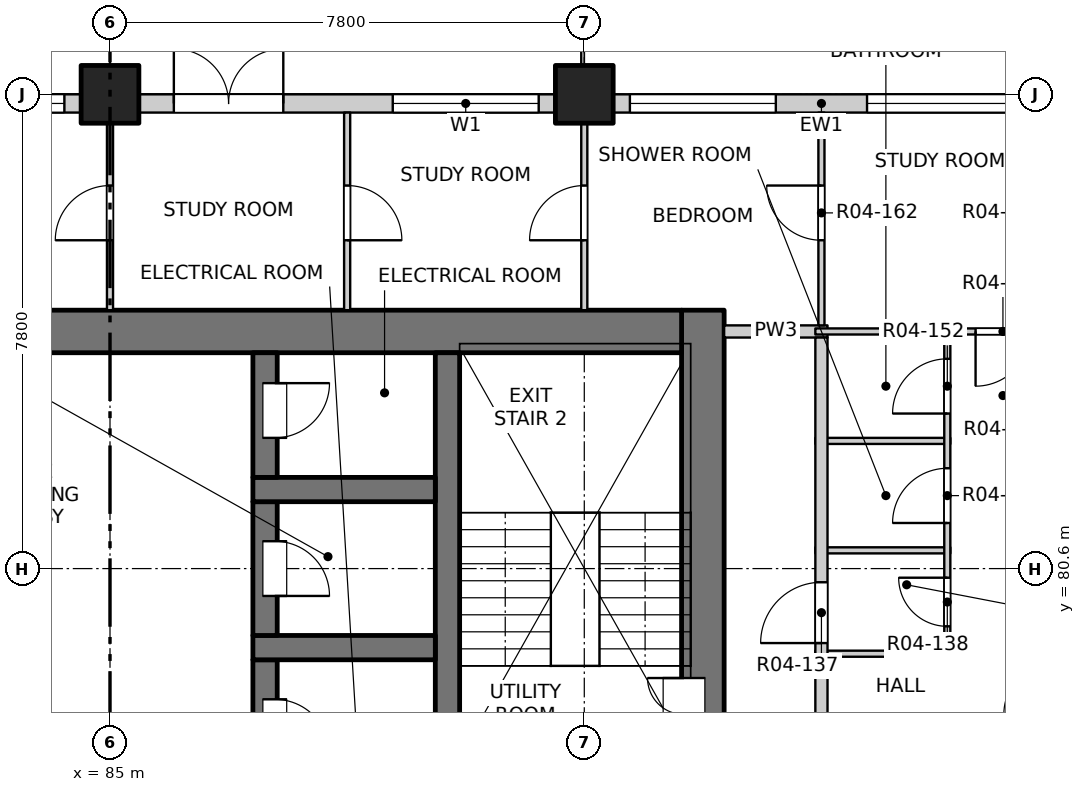
"""IFC4 building model, lengths in metres.
Left out: names, types, materials, properties, quantities, classifications, styles, units other than length and angle.
Written with IfcOpenShell. Run it as: python <this file> out.ifc"""

import sys

from ifc_helpers import new_model, si_unit, direction, frame, frame_2d, origin, origin_2d, place, context, subcontext, project, spatial, rectangle, extrude, element, fill, save


model = new_model("IFC4")
c1 = context("Model", 3, precision=1e-05, world=origin(), true_north=direction((0.0, 1.0)))
c2 = subcontext(c1, "Body", "Model", "MODEL_VIEW")
j1 = project(units=[si_unit("LENGTHUNIT", "METRE"), si_unit("PLANEANGLEUNIT", "RADIAN")], contexts=[c1])
p1 = place(None, origin())
s1 = spatial("IfcSite", under=j1, at=p1, CompositionType="ELEMENT")
p2 = place(p1, origin())
s2 = spatial("IfcBuilding", under=s1, at=p2, CompositionType="ELEMENT")
p3 = place(p2, frame((0.0, 0.0, 58.0)))
s3 = spatial("IfcBuildingStorey", under=s2, at=p3, CompositionType="ELEMENT", Elevation=58.0)
for number, where, z_axis, x_axis in (
    (1, (85.0, 88.4, -0.25), (0.0, 0.0, 1.0), (1.0, 0.0, 0.0)),
    (2, (92.8, 88.4, -0.25), (0.0, 0.0, 1.0), (1.0, 0.0, 0.0)),
):
    element("IfcColumn", number, at=place(p3, frame(where, z_axis=z_axis, x_axis=x_axis)), inside=s3, PredefinedType="COLUMN", context=c2, shape_type="SweptSolid", body=[
        extrude(rectangle(XDim=0.95, YDim=0.95, at=origin_2d()), origin(), (0.0, 0.0, 1.0), 3.4),
    ])
p4 = place(p3, frame((94.75, 77.3, -0.25), z_axis=(0.0, 0.0, 1.0), x_axis=(0.0, 1.0, 0.0)))
e3 = element("IfcWall", 3, at=p4, inside=s3, PredefinedType="SOLIDWALL", context=c2, shape_type="SweptSolid", body=[
    extrude(rectangle(XDim=7.55, YDim=0.7, at=frame_2d((3.775, 0.0))), origin(), (0.0, 0.0, 1.0), 3.4),
])
p5 = place(p4, frame((0.3, 0.0, 0.25)))
e4 = element("IfcOpeningElement", 4, at=p5, cuts=e3, PredefinedType="OPENING", context=c2, shape_type="SweptSolid", body=[
    extrude(rectangle(XDim=1.2, YDim=2.1, at=frame_2d((0.6, 1.05))), frame((0.0, 0.36, 0.0), z_axis=(0.0, -1.0, 0.0), x_axis=(1.0, 0.0, 0.0)), (0.0, 0.0, 1.0), 0.72),
])
p6 = place(p3, frame((75.6, 84.5, -0.25), z_axis=(0.0, 0.0, 1.0), x_axis=(1.0, 0.0, 0.0)))
e5 = element("IfcWall", 5, at=p6, inside=s3, PredefinedType="SOLIDWALL", context=c2, shape_type="SweptSolid", body=[
    extrude(rectangle(XDim=18.8, YDim=0.7, at=frame_2d((9.4, 0.0))), origin(), (0.0, 0.0, 1.0), 3.4),
])
p7 = place(p3, frame((90.55, 77.3, -0.25), z_axis=(0.0, 0.0, 1.0), x_axis=(0.0, 1.0, 0.0)))
e6 = element("IfcWall", 6, at=p7, inside=s3, PredefinedType="SOLIDWALL", context=c2, shape_type="SweptSolid", body=[
    extrude(rectangle(XDim=6.85, YDim=0.4, at=frame_2d((3.425, 0.0))), origin(), (0.0, 0.0, 1.0), 3.4),
])
p8 = place(p3, frame((87.55, 76.9, -0.25), z_axis=(0.0, 0.0, 1.0), x_axis=(0.0, 1.0, 0.0)))
e7 = element("IfcWall", 7, at=p8, inside=s3, PredefinedType="SOLIDWALL", context=c2, shape_type="SweptSolid", body=[
    extrude(rectangle(XDim=2.2, YDim=0.4, at=frame_2d((1.1, 0.0))), origin(), (0.0, 0.0, 1.0), 3.4),
])
p9 = place(p8, frame((0.65, 0.0, 0.25)))
e8 = element("IfcOpeningElement", 8, at=p9, cuts=e7, PredefinedType="OPENING", context=c2, shape_type="SweptSolid", body=[
    extrude(rectangle(XDim=0.9, YDim=2.1, at=frame_2d((0.45, 1.05))), frame((0.0, 0.21, 0.0), z_axis=(0.0, -1.0, 0.0), x_axis=(1.0, 0.0, 0.0)), (0.0, 0.0, 1.0), 0.42),
])
p10 = place(p3, frame((87.35, 79.3, -0.25), z_axis=(0.0, 0.0, 1.0), x_axis=(1.0, 0.0, 0.0)))
e9 = element("IfcWall", 9, at=p10, inside=s3, PredefinedType="SOLIDWALL", context=c2, shape_type="SweptSolid", body=[
    extrude(rectangle(XDim=3.0, YDim=0.4, at=frame_2d((1.5, 0.0))), origin(), (0.0, 0.0, 1.0), 3.4),
])
p11 = place(p3, frame((87.55, 79.5, -0.25), z_axis=(0.0, 0.0, 1.0), x_axis=(0.0, 1.0, 0.0)))
e10 = element("IfcWall", 10, at=p11, inside=s3, PredefinedType="SOLIDWALL", context=c2, shape_type="SweptSolid", body=[
    extrude(rectangle(XDim=2.2, YDim=0.4, at=frame_2d((1.1, 0.0))), origin(), (0.0, 0.0, 1.0), 3.4),
])
p12 = place(p11, frame((0.65, 0.0, 0.25)))
e11 = element("IfcOpeningElement", 11, at=p12, cuts=e10, PredefinedType="OPENING", context=c2, shape_type="SweptSolid", body=[
    extrude(rectangle(XDim=0.9, YDim=2.1, at=frame_2d((0.45, 1.05))), frame((0.0, 0.21, 0.0), z_axis=(0.0, -1.0, 0.0), x_axis=(1.0, 0.0, 0.0)), (0.0, 0.0, 1.0), 0.42),
])
p13 = place(p3, frame((87.35, 81.9, -0.25), z_axis=(0.0, 0.0, 1.0), x_axis=(1.0, 0.0, 0.0)))
e12 = element("IfcWall", 12, at=p13, inside=s3, PredefinedType="SOLIDWALL", context=c2, shape_type="SweptSolid", body=[
    extrude(rectangle(XDim=3.0, YDim=0.4, at=frame_2d((1.5, 0.0))), origin(), (0.0, 0.0, 1.0), 3.4),
])
p14 = place(p3, frame((87.55, 82.1, -0.25), z_axis=(0.0, 0.0, 1.0), x_axis=(0.0, 1.0, 0.0)))
e13 = element("IfcWall", 13, at=p14, inside=s3, PredefinedType="SOLIDWALL", context=c2, shape_type="SweptSolid", body=[
    extrude(rectangle(XDim=2.05, YDim=0.4, at=frame_2d((1.025, 0.0))), origin(), (0.0, 0.0, 1.0), 3.4),
])
p15 = place(p14, frame((0.65, 0.0, 0.25)))
e14 = element("IfcOpeningElement", 14, at=p15, cuts=e13, PredefinedType="OPENING", context=c2, shape_type="SweptSolid", body=[
    extrude(rectangle(XDim=0.9, YDim=2.1, at=frame_2d((0.45, 1.05))), frame((0.0, 0.21, 0.0), z_axis=(0.0, -1.0, 0.0), x_axis=(1.0, 0.0, 0.0)), (0.0, 0.0, 1.0), 0.42),
])
p16 = place(p3, frame((77.675, 88.25, 0.0), z_axis=(0.0, 0.0, 1.0), x_axis=(1.0, 0.0, 0.0)))
e15 = element("IfcWall", 15, at=p16, inside=s3, PredefinedType="SOLIDWALL", context=c2, shape_type="SweptSolid", body=[
    extrude(rectangle(XDim=6.85, YDim=0.3, at=frame_2d((3.425, 0.0))), origin(), (0.0, 0.0, 1.0), 2.7),
])
p17 = place(p16, frame((0.575, 0.0, 0.0)))
e16 = element("IfcOpeningElement", 16, at=p17, cuts=e15, PredefinedType="OPENING", context=c2, shape_type="SweptSolid", body=[
    extrude(rectangle(XDim=1.8, YDim=2.4, at=frame_2d((0.9, 1.2))), frame((0.0, 0.16, 0.0), z_axis=(0.0, -1.0, 0.0), x_axis=(1.0, 0.0, 0.0)), (0.0, 0.0, 1.0), 0.32),
])
p18 = place(p16, frame((4.175, 0.0, 0.9)))
e17 = element("IfcOpeningElement", 17, at=p18, cuts=e15, PredefinedType="OPENING", context=c2, shape_type="SweptSolid", body=[
    extrude(rectangle(XDim=2.4, YDim=1.8, at=frame_2d((1.2, 0.9))), frame((0.0, 0.16, 0.0), z_axis=(0.0, -1.0, 0.0), x_axis=(1.0, 0.0, 0.0)), (0.0, 0.0, 1.0), 0.32),
])
p19 = place(p3, frame((85.475, 88.25, 0.0), z_axis=(0.0, 0.0, 1.0), x_axis=(1.0, 0.0, 0.0)))
e18 = element("IfcWall", 18, at=p19, inside=s3, PredefinedType="SOLIDWALL", context=c2, shape_type="SweptSolid", body=[
    extrude(rectangle(XDim=6.85, YDim=0.3, at=frame_2d((3.425, 0.0))), origin(), (0.0, 0.0, 1.0), 2.7),
])
p20 = place(p19, frame((0.575, 0.0, 0.0)))
e19 = element("IfcOpeningElement", 19, at=p20, cuts=e18, PredefinedType="OPENING", context=c2, shape_type="SweptSolid", body=[
    extrude(rectangle(XDim=1.8, YDim=2.4, at=frame_2d((0.9, 1.2))), frame((0.0, 0.16, 0.0), z_axis=(0.0, -1.0, 0.0), x_axis=(1.0, 0.0, 0.0)), (0.0, 0.0, 1.0), 0.32),
])
p21 = place(p19, frame((4.175, 0.0, 0.9)))
e20 = element("IfcOpeningElement", 20, at=p21, cuts=e18, PredefinedType="OPENING", context=c2, shape_type="SweptSolid", body=[
    extrude(rectangle(XDim=2.4, YDim=1.8, at=frame_2d((1.2, 0.9))), frame((0.0, 0.16, 0.0), z_axis=(0.0, -1.0, 0.0), x_axis=(1.0, 0.0, 0.0)), (0.0, 0.0, 1.0), 0.32),
])
p22 = place(p3, frame((93.275, 88.25, 0.0), z_axis=(0.0, 0.0, 1.0), x_axis=(1.0, 0.0, 0.0)))
e21 = element("IfcWall", 21, at=p22, inside=s3, PredefinedType="SOLIDWALL", context=c2, shape_type="SweptSolid", body=[
    extrude(rectangle(XDim=6.85, YDim=0.3, at=frame_2d((3.425, 0.0))), origin(), (0.0, 0.0, 1.0), 2.7),
])
p23 = place(p22, frame((0.275, 0.0, 0.9)))
e22 = element("IfcOpeningElement", 22, at=p23, cuts=e21, PredefinedType="OPENING", context=c2, shape_type="SweptSolid", body=[
    extrude(rectangle(XDim=2.4, YDim=1.8, at=frame_2d((1.2, 0.9))), frame((0.0, 0.16, 0.0), z_axis=(0.0, -1.0, 0.0), x_axis=(1.0, 0.0, 0.0)), (0.0, 0.0, 1.0), 0.32),
])
p24 = place(p22, frame((4.175, 0.0, 0.9)))
e23 = element("IfcOpeningElement", 23, at=p24, cuts=e21, PredefinedType="OPENING", context=c2, shape_type="SweptSolid", body=[
    extrude(rectangle(XDim=2.4, YDim=1.8, at=frame_2d((1.2, 0.9))), frame((0.0, 0.16, 0.0), z_axis=(0.0, -1.0, 0.0), x_axis=(1.0, 0.0, 0.0)), (0.0, 0.0, 1.0), 0.32),
])
for number, where, z_axis, x_axis in (
    (24, (96.6, 79.2, 0.0), (0.0, 0.0, 1.0), (1.0, 0.0, 0.0)),
    (25, (96.6, 80.9, 0.0), (0.0, 0.0, 1.0), (1.0, 0.0, 0.0)),
    (26, (96.6, 82.7, 0.0), (0.0, 0.0, 1.0), (1.0, 0.0, 0.0)),
):
    element("IfcWall", number, at=place(p3, frame(where, z_axis=z_axis, x_axis=x_axis)), inside=s3, PredefinedType="PARTITIONING", context=c2, shape_type="SweptSolid", body=[
        extrude(rectangle(XDim=2.22, YDim=0.1, at=frame_2d((1.11, 0.0))), origin(), (0.0, 0.0, 1.0), 3.15),
    ])
p25 = place(p3, frame((95.1, 84.5, 0.0), z_axis=(0.0, 0.0, 1.0), x_axis=(1.0, 0.0, 0.0)))
e27 = element("IfcWall", 27, at=p25, inside=s3, PredefinedType="PARTITIONING", context=c2, shape_type="SweptSolid", body=[
    extrude(rectangle(XDim=1.7, YDim=0.2, at=frame_2d((0.85, 0.0))), origin(), (0.0, 0.0, 1.0), 3.15),
])
p26 = place(p3, frame((96.6, 84.5, 0.0), z_axis=(0.0, 0.0, 1.0), x_axis=(1.0, 0.0, 0.0)))
e28 = element("IfcWall", 28, at=p26, inside=s3, PredefinedType="PARTITIONING", context=c2, shape_type="SweptSolid", body=[
    extrude(rectangle(XDim=11.5, YDim=0.1, at=frame_2d((5.75, 0.0))), origin(), (0.0, 0.0, 1.0), 3.15),
])
p27 = place(p26, frame((2.635, 0.0, 0.0)))
e29 = element("IfcOpeningElement", 29, at=p27, cuts=e28, PredefinedType="OPENING", context=c2, shape_type="SweptSolid", body=[
    extrude(rectangle(XDim=0.9, YDim=2.1, at=frame_2d((0.45, 1.05))), frame((0.0, 0.06, 0.0), z_axis=(0.0, -1.0, 0.0), x_axis=(1.0, 0.0, 0.0)), (0.0, 0.0, 1.0), 0.12),
])
p28 = place(p3, frame((85.0, 84.85, 0.0), z_axis=(0.0, 0.0, 1.0), x_axis=(0.0, 1.0, 0.0)))
e30 = element("IfcWall", 30, at=p28, inside=s3, PredefinedType="PARTITIONING", context=c2, shape_type="SweptSolid", body=[
    extrude(rectangle(XDim=3.25, YDim=0.1, at=frame_2d((1.625, 0.0))), origin(), (0.0, 0.0, 1.0), 3.15),
])
p29 = place(p28, frame((1.15, 0.0, 0.0)))
e31 = element("IfcOpeningElement", 31, at=p29, cuts=e30, PredefinedType="OPENING", context=c2, shape_type="SweptSolid", body=[
    extrude(rectangle(XDim=0.9, YDim=2.1, at=frame_2d((0.45, 1.05))), frame((0.0, 0.06, 0.0), z_axis=(0.0, -1.0, 0.0), x_axis=(1.0, 0.0, 0.0)), (0.0, 0.0, 1.0), 0.12),
])
p30 = place(p3, frame((88.9, 84.85, 0.0), z_axis=(0.0, 0.0, 1.0), x_axis=(0.0, 1.0, 0.0)))
e32 = element("IfcWall", 32, at=p30, inside=s3, PredefinedType="PARTITIONING", context=c2, shape_type="SweptSolid", body=[
    extrude(rectangle(XDim=3.25, YDim=0.1, at=frame_2d((1.625, 0.0))), origin(), (0.0, 0.0, 1.0), 3.15),
])
p31 = place(p30, frame((1.15, 0.0, 0.0)))
e33 = element("IfcOpeningElement", 33, at=p31, cuts=e32, PredefinedType="OPENING", context=c2, shape_type="SweptSolid", body=[
    extrude(rectangle(XDim=0.9, YDim=2.1, at=frame_2d((0.45, 1.05))), frame((0.0, 0.06, 0.0), z_axis=(0.0, -1.0, 0.0), x_axis=(1.0, 0.0, 0.0)), (0.0, 0.0, 1.0), 0.12),
])
p32 = place(p3, frame((92.8, 84.85, 0.0), z_axis=(0.0, 0.0, 1.0), x_axis=(0.0, 1.0, 0.0)))
e34 = element("IfcWall", 34, at=p32, inside=s3, PredefinedType="PARTITIONING", context=c2, shape_type="SweptSolid", body=[
    extrude(rectangle(XDim=3.25, YDim=0.1, at=frame_2d((1.625, 0.0))), origin(), (0.0, 0.0, 1.0), 3.15),
])
p33 = place(p32, frame((1.15, 0.0, 0.0)))
e35 = element("IfcOpeningElement", 35, at=p33, cuts=e34, PredefinedType="OPENING", context=c2, shape_type="SweptSolid", body=[
    extrude(rectangle(XDim=0.9, YDim=2.1, at=frame_2d((0.45, 1.05))), frame((0.0, 0.06, 0.0), z_axis=(0.0, -1.0, 0.0), x_axis=(1.0, 0.0, 0.0)), (0.0, 0.0, 1.0), 0.12),
])
p34 = place(p3, frame((96.7, 53.4, 0.0), z_axis=(0.0, 0.0, 1.0), x_axis=(0.0, 1.0, 0.0)))
e36 = element("IfcWall", 36, at=p34, inside=s3, PredefinedType="PARTITIONING", context=c2, shape_type="SweptSolid", body=[
    extrude(rectangle(XDim=31.0, YDim=0.2, at=frame_2d((15.5, 0.0))), origin(), (0.0, 0.0, 1.0), 3.15),
])
p35 = place(p34, frame((3.525, 0.0, 0.0)))
e37 = element("IfcOpeningElement", 37, at=p35, cuts=e36, PredefinedType="OPENING", context=c2, shape_type="SweptSolid", body=[
    extrude(rectangle(XDim=1.0, YDim=2.1, at=frame_2d((0.5, 1.05))), frame((0.0, 0.11, 0.0), z_axis=(0.0, -1.0, 0.0), x_axis=(1.0, 0.0, 0.0)), (0.0, 0.0, 1.0), 0.22),
])
p36 = place(p34, frame((10.825, 0.0, 0.0)))
e38 = element("IfcOpeningElement", 38, at=p36, cuts=e36, PredefinedType="OPENING", context=c2, shape_type="SweptSolid", body=[
    extrude(rectangle(XDim=1.0, YDim=2.1, at=frame_2d((0.5, 1.05))), frame((0.0, 0.11, 0.0), z_axis=(0.0, -1.0, 0.0), x_axis=(1.0, 0.0, 0.0)), (0.0, 0.0, 1.0), 0.22),
])
p37 = place(p34, frame((25.975, 0.0, 0.0)))
e39 = element("IfcOpeningElement", 39, at=p37, cuts=e36, PredefinedType="OPENING", context=c2, shape_type="SweptSolid", body=[
    extrude(rectangle(XDim=1.0, YDim=2.1, at=frame_2d((0.5, 1.05))), frame((0.0, 0.11, 0.0), z_axis=(0.0, -1.0, 0.0), x_axis=(1.0, 0.0, 0.0)), (0.0, 0.0, 1.0), 0.22),
])
p38 = place(p3, frame((96.7, 84.6, 0.0), z_axis=(0.0, 0.0, 1.0), x_axis=(0.0, 1.0, 0.0)))
e40 = element("IfcWall", 40, at=p38, inside=s3, PredefinedType="PARTITIONING", context=c2, shape_type="SweptSolid", body=[
    extrude(rectangle(XDim=3.5, YDim=0.1, at=frame_2d((1.75, 0.0))), origin(), (0.0, 0.0, 1.0), 3.15),
])
p39 = place(p38, frame((1.4, 0.0, 0.0)))
e41 = element("IfcOpeningElement", 41, at=p39, cuts=e40, PredefinedType="OPENING", context=c2, shape_type="SweptSolid", body=[
    extrude(rectangle(XDim=0.9, YDim=2.1, at=frame_2d((0.45, 1.05))), frame((0.0, 0.06, 0.0), z_axis=(0.0, -1.0, 0.0), x_axis=(1.0, 0.0, 0.0)), (0.0, 0.0, 1.0), 0.12),
])
p40 = place(p3, frame((98.77, 79.25, 0.0), z_axis=(0.0, 0.0, 1.0), x_axis=(0.0, 1.0, 0.0)))
e42 = element("IfcWall", 42, at=p40, inside=s3, PredefinedType="PARTITIONING", context=c2, shape_type="SweptSolid", body=[
    extrude(rectangle(XDim=5.2, YDim=0.1, at=frame_2d((2.6, 0.0))), origin(), (0.0, 0.0, 1.0), 3.15),
])
p41 = place(p40, frame((0.4, 0.0, 0.0)))
e43 = element("IfcOpeningElement", 43, at=p41, cuts=e42, PredefinedType="OPENING", context=c2, shape_type="SweptSolid", body=[
    extrude(rectangle(XDim=0.8, YDim=2.1, at=frame_2d((0.4, 1.05))), frame((0.0, 0.06, 0.0), z_axis=(0.0, -1.0, 0.0), x_axis=(1.0, 0.0, 0.0)), (0.0, 0.0, 1.0), 0.12),
])
p42 = place(p40, frame((2.1, 0.0, 0.0)))
e44 = element("IfcOpeningElement", 44, at=p42, cuts=e42, PredefinedType="OPENING", context=c2, shape_type="SweptSolid", body=[
    extrude(rectangle(XDim=0.9, YDim=2.1, at=frame_2d((0.45, 1.05))), frame((0.0, 0.06, 0.0), z_axis=(0.0, -1.0, 0.0), x_axis=(1.0, 0.0, 0.0)), (0.0, 0.0, 1.0), 0.12),
])
p43 = place(p40, frame((3.9, 0.0, 0.0)))
e45 = element("IfcOpeningElement", 45, at=p43, cuts=e42, PredefinedType="OPENING", context=c2, shape_type="SweptSolid", body=[
    extrude(rectangle(XDim=0.9, YDim=2.1, at=frame_2d((0.45, 1.05))), frame((0.0, 0.06, 0.0), z_axis=(0.0, -1.0, 0.0), x_axis=(1.0, 0.0, 0.0)), (0.0, 0.0, 1.0), 0.12),
])
p44 = place(p18, origin())
e46 = element("IfcWindow", 46, at=p44, inside=s3, PartitioningType="DOUBLE_PANEL_VERTICAL", PredefinedType="WINDOW", context=c2, shape_type="SweptSolid", body=[
    extrude(rectangle(XDim=2.4, YDim=1.8, at=frame_2d((1.2, 0.9))), frame((0.0, 0.03, 0.0), z_axis=(0.0, -1.0, 0.0), x_axis=(1.0, 0.0, 0.0)), (0.0, 0.0, 1.0), 0.06),
])
fill(e17, e46)
p45 = place(p20, origin())
e47 = element("IfcDoor", 47, at=p45, inside=s3, OperationType="DOUBLE_DOOR_SINGLE_SWING", PredefinedType="DOOR", context=c2, shape_type="SweptSolid", body=[
    extrude(rectangle(XDim=1.8, YDim=2.4, at=frame_2d((0.9, 1.2))), frame((0.0, 0.025, 0.0), z_axis=(0.0, -1.0, 0.0), x_axis=(1.0, 0.0, 0.0)), (0.0, 0.0, 1.0), 0.05),
])
fill(e19, e47)
p46 = place(p21, origin())
e48 = element("IfcWindow", 48, at=p46, inside=s3, PartitioningType="DOUBLE_PANEL_VERTICAL", PredefinedType="WINDOW", context=c2, shape_type="SweptSolid", body=[
    extrude(rectangle(XDim=2.4, YDim=1.8, at=frame_2d((1.2, 0.9))), frame((0.0, 0.03, 0.0), z_axis=(0.0, -1.0, 0.0), x_axis=(1.0, 0.0, 0.0)), (0.0, 0.0, 1.0), 0.06),
])
fill(e20, e48)
p47 = place(p23, origin())
e49 = element("IfcWindow", 49, at=p47, inside=s3, PartitioningType="DOUBLE_PANEL_VERTICAL", PredefinedType="WINDOW", context=c2, shape_type="SweptSolid", body=[
    extrude(rectangle(XDim=2.4, YDim=1.8, at=frame_2d((1.2, 0.9))), frame((0.0, 0.03, 0.0), z_axis=(0.0, -1.0, 0.0), x_axis=(1.0, 0.0, 0.0)), (0.0, 0.0, 1.0), 0.06),
])
fill(e22, e49)
p48 = place(p24, origin())
e50 = element("IfcWindow", 50, at=p48, inside=s3, PartitioningType="DOUBLE_PANEL_VERTICAL", PredefinedType="WINDOW", context=c2, shape_type="SweptSolid", body=[
    extrude(rectangle(XDim=2.4, YDim=1.8, at=frame_2d((1.2, 0.9))), frame((0.0, 0.03, 0.0), z_axis=(0.0, -1.0, 0.0), x_axis=(1.0, 0.0, 0.0)), (0.0, 0.0, 1.0), 0.06),
])
fill(e23, e50)
p49 = place(p9, origin())
e51 = element("IfcDoor", 51, at=p49, inside=s3, OperationType="SINGLE_SWING_RIGHT", PredefinedType="DOOR", context=c2, shape_type="SweptSolid", body=[
    extrude(rectangle(XDim=0.9, YDim=2.1, at=frame_2d((0.45, 1.05))), frame((0.0, -0.135, 0.0), z_axis=(0.0, -1.0, 0.0), x_axis=(1.0, 0.0, 0.0)), (0.0, 0.0, 1.0), 0.05),
])
fill(e8, e51)
p50 = place(p5, origin())
e52 = element("IfcDoor", 52, at=p50, inside=s3, OperationType="DOUBLE_DOOR_SINGLE_SWING", PredefinedType="DOOR", context=c2, shape_type="SweptSolid", body=[
    extrude(rectangle(XDim=1.2, YDim=2.1, at=frame_2d((0.6, 1.05))), frame((0.0, 0.335, 0.0), z_axis=(0.0, -1.0, 0.0), x_axis=(1.0, 0.0, 0.0)), (0.0, 0.0, 1.0), 0.05),
])
fill(e4, e52)
p51 = place(p37, origin())
e53 = element("IfcDoor", 53, at=p51, inside=s3, OperationType="SINGLE_SWING_LEFT", PredefinedType="DOOR", context=c2, shape_type="SweptSolid", body=[
    extrude(rectangle(XDim=1.0, YDim=2.1, at=frame_2d((0.5, 1.05))), frame((0.0, 0.025, 0.0), z_axis=(0.0, -1.0, 0.0), x_axis=(1.0, 0.0, 0.0)), (0.0, 0.0, 1.0), 0.05),
])
fill(e39, e53)
p52 = place(p41, origin())
e54 = element("IfcDoor", 54, at=p52, inside=s3, OperationType="SINGLE_SWING_RIGHT", PredefinedType="DOOR", context=c2, shape_type="SweptSolid", body=[
    extrude(rectangle(XDim=0.8, YDim=2.1, at=frame_2d((0.4, 1.05))), frame((0.0, 0.025, 0.0), z_axis=(0.0, -1.0, 0.0), x_axis=(1.0, 0.0, 0.0)), (0.0, 0.0, 1.0), 0.05),
])
fill(e43, e54)
p53 = place(p12, origin())
e55 = element("IfcDoor", 55, at=p53, inside=s3, OperationType="SINGLE_SWING_RIGHT", PredefinedType="DOOR", context=c2, shape_type="SweptSolid", body=[
    extrude(rectangle(XDim=0.9, YDim=2.1, at=frame_2d((0.45, 1.05))), frame((0.0, -0.135, 0.0), z_axis=(0.0, -1.0, 0.0), x_axis=(1.0, 0.0, 0.0)), (0.0, 0.0, 1.0), 0.05),
])
fill(e11, e55)
p54 = place(p42, origin())
e56 = element("IfcDoor", 56, at=p54, inside=s3, OperationType="SINGLE_SWING_LEFT", PredefinedType="DOOR", context=c2, shape_type="SweptSolid", body=[
    extrude(rectangle(XDim=0.9, YDim=2.1, at=frame_2d((0.45, 1.05))), frame((0.0, 0.025, 0.0), z_axis=(0.0, -1.0, 0.0), x_axis=(1.0, 0.0, 0.0)), (0.0, 0.0, 1.0), 0.05),
])
fill(e44, e56)
p55 = place(p15, origin())
e57 = element("IfcDoor", 57, at=p55, inside=s3, OperationType="SINGLE_SWING_LEFT", PredefinedType="DOOR", context=c2, shape_type="SweptSolid", body=[
    extrude(rectangle(XDim=0.9, YDim=2.1, at=frame_2d((0.45, 1.05))), frame((0.0, -0.135, 0.0), z_axis=(0.0, -1.0, 0.0), x_axis=(1.0, 0.0, 0.0)), (0.0, 0.0, 1.0), 0.05),
])
fill(e14, e57)
p56 = place(p43, origin())
e58 = element("IfcDoor", 58, at=p56, inside=s3, OperationType="SINGLE_SWING_LEFT", PredefinedType="DOOR", context=c2, shape_type="SweptSolid", body=[
    extrude(rectangle(XDim=0.9, YDim=2.1, at=frame_2d((0.45, 1.05))), frame((0.0, 0.025, 0.0), z_axis=(0.0, -1.0, 0.0), x_axis=(1.0, 0.0, 0.0)), (0.0, 0.0, 1.0), 0.05),
])
fill(e45, e58)
p57 = place(p27, origin())
e59 = element("IfcDoor", 59, at=p57, inside=s3, OperationType="SINGLE_SWING_RIGHT", PredefinedType="DOOR", context=c2, shape_type="SweptSolid", body=[
    extrude(rectangle(XDim=0.9, YDim=2.1, at=frame_2d((0.45, 1.05))), frame((0.0, 0.025, 0.0), z_axis=(0.0, -1.0, 0.0), x_axis=(1.0, 0.0, 0.0)), (0.0, 0.0, 1.0), 0.05),
])
fill(e29, e59)
p58 = place(p29, origin())
e60 = element("IfcDoor", 60, at=p58, inside=s3, OperationType="SINGLE_SWING_LEFT", PredefinedType="DOOR", context=c2, shape_type="SweptSolid", body=[
    extrude(rectangle(XDim=0.9, YDim=2.1, at=frame_2d((0.45, 1.05))), frame((0.0, 0.025, 0.0), z_axis=(0.0, -1.0, 0.0), x_axis=(1.0, 0.0, 0.0)), (0.0, 0.0, 1.0), 0.05),
])
fill(e31, e60)
p59 = place(p31, origin())
e61 = element("IfcDoor", 61, at=p59, inside=s3, OperationType="SINGLE_SWING_RIGHT", PredefinedType="DOOR", context=c2, shape_type="SweptSolid", body=[
    extrude(rectangle(XDim=0.9, YDim=2.1, at=frame_2d((0.45, 1.05))), frame((0.0, 0.025, 0.0), z_axis=(0.0, -1.0, 0.0), x_axis=(1.0, 0.0, 0.0)), (0.0, 0.0, 1.0), 0.05),
])
fill(e33, e61)
p60 = place(p33, origin())
e62 = element("IfcDoor", 62, at=p60, inside=s3, OperationType="SINGLE_SWING_LEFT", PredefinedType="DOOR", context=c2, shape_type="SweptSolid", body=[
    extrude(rectangle(XDim=0.9, YDim=2.1, at=frame_2d((0.45, 1.05))), frame((0.0, 0.025, 0.0), z_axis=(0.0, -1.0, 0.0), x_axis=(1.0, 0.0, 0.0)), (0.0, 0.0, 1.0), 0.05),
])
fill(e35, e62)
p61 = place(p39, origin())
e63 = element("IfcDoor", 63, at=p61, inside=s3, OperationType="SINGLE_SWING_RIGHT", PredefinedType="DOOR", context=c2, shape_type="SweptSolid", body=[
    extrude(rectangle(XDim=0.9, YDim=2.1, at=frame_2d((0.45, 1.05))), frame((0.0, 0.025, 0.0), z_axis=(0.0, -1.0, 0.0), x_axis=(1.0, 0.0, 0.0)), (0.0, 0.0, 1.0), 0.05),
])
fill(e41, e63)
save(model, sys.argv[1])
